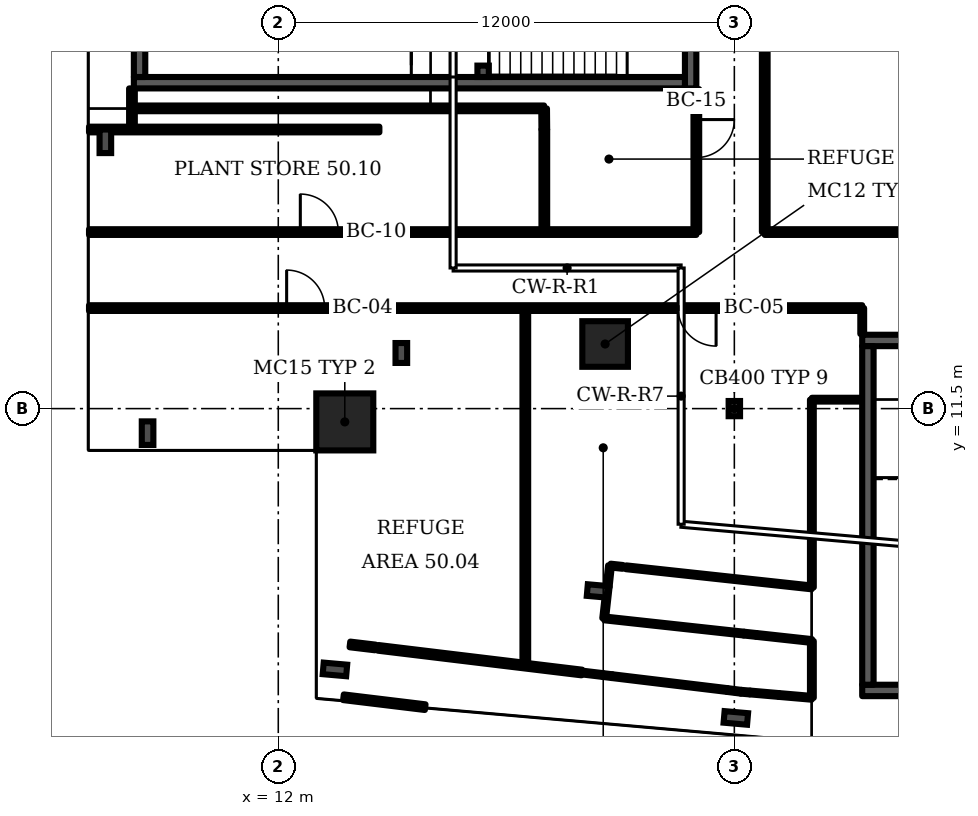
"""IFC4 building model, lengths in metres.
Left out: names, types, materials, properties, quantities, classifications, styles, units other than length and angle.
Written with IfcOpenShell. Run it as: python <this file> out.ifc"""

import sys

from ifc_helpers import new_model, si_unit, direction, frame, frame_2d, origin, origin_2d, place, context, subcontext, project, spatial, rectangle, i_section, extrude, element, fill, save


model = new_model("IFC4")
c1 = context("Model", 3, precision=1e-05, world=origin(), true_north=direction((0.0, 1.0)))
c2 = subcontext(c1, "Body", "Model", "MODEL_VIEW")
j1 = project(units=[si_unit("LENGTHUNIT", "METRE"), si_unit("PLANEANGLEUNIT", "RADIAN")], contexts=[c1])
p1 = place(None, origin())
s1 = spatial("IfcSite", under=j1, at=p1, CompositionType="ELEMENT")
p2 = place(p1, origin())
s2 = spatial("IfcBuilding", under=s1, at=p2, CompositionType="ELEMENT")
p3 = place(p2, frame((0.0, 0.0, 202.3)))
s3 = spatial("IfcBuildingStorey", under=s2, at=p3, CompositionType="ELEMENT", Elevation=202.3)
p4 = place(p3, frame((20.6, 13.2, 0.0), z_axis=(0.0, 0.0, 1.0), x_axis=(1.0, 0.0, 0.0)))
e1 = element("IfcColumn", 1, at=p4, inside=s3, PredefinedType="COLUMN", context=c2, shape_type="SweptSolid", body=[
    extrude(rectangle(XDim=1.2, YDim=1.2, at=origin_2d()), origin(), (0.0, 0.0, 1.0), 4.8),
])
for number, where, z_axis, x_axis in (
    (2, (20.392, 6.703, 0.0), (0.0, 0.0, 1.0), (-0.087, -0.996, 0.0)),
    (3, (15.238, 12.963, 0.0), (0.0, 0.0, 1.0), (-1.0, 0.0, 0.0)),
):
    element("IfcColumn", number, at=place(p3, frame(where, z_axis=z_axis, x_axis=x_axis)), inside=s3, PredefinedType="COLUMN", context=c2, shape_type="SweptSolid", body=[
        extrude(i_section(OverallWidth=0.306, OverallDepth=0.524, WebThickness=0.021, FlangeThickness=0.04, FilletRadius=0.027, at=origin_2d()), origin(), (0.0, 0.0, 1.0), 4.8),
    ])
p5 = place(p3, frame((24.0, 11.5, 0.0), z_axis=(0.0, 0.0, 1.0), x_axis=(1.0, 0.0, 0.0)))
e4 = element("IfcColumn", 4, at=p5, inside=s3, PredefinedType="COLUMN", context=c2, shape_type="SweptSolid", body=[
    extrude(i_section(OverallWidth=0.3, OverallDepth=0.4, WebThickness=0.013, FlangeThickness=0.024, FilletRadius=0.027, at=origin_2d()), origin(), (0.0, 0.0, 1.0), 4.8),
])
p6 = place(p3, frame((13.75, 11.15, 0.0), z_axis=(0.0, 0.0, 1.0), x_axis=(1.0, 0.0, 0.0)))
e5 = element("IfcColumn", 5, at=p6, inside=s3, PredefinedType="COLUMN", context=c2, shape_type="SweptSolid", body=[
    extrude(rectangle(XDim=1.5, YDim=1.5, at=origin_2d()), origin(), (0.0, 0.0, 1.0), 4.8),
])
for number, where, z_axis, x_axis in (
    (6, (13.491, 4.637, 0.0), (0.0, 0.0, 1.0), (-0.087, -0.996, 0.0)),
    (7, (24.039, 3.361, 0.0), (0.0, 0.0, 1.0), (-0.087, -0.996, 0.0)),
    (8, (7.45, 18.533, 0.0), (0.0, 0.0, 1.0), (-1.0, 0.0, 0.0)),
    (9, (8.561, 10.854, 0.0), (0.0, 0.0, 1.0), (-1.0, 0.0, 0.0)),
):
    element("IfcColumn", number, at=place(p3, frame(where, z_axis=z_axis, x_axis=x_axis)), inside=s3, PredefinedType="COLUMN", context=c2, shape_type="SweptSolid", body=[
        extrude(i_section(OverallWidth=0.305, OverallDepth=0.62, WebThickness=0.021, FlangeThickness=0.04, FilletRadius=0.027, at=origin_2d()), origin(), (0.0, 0.0, 1.0), 4.8),
    ])
p7 = place(p3, frame((22.85, 19.925, 0.0), z_axis=(0.0, 0.0, 1.0), x_axis=(0.0, 1.0, 0.0)))
e10 = element("IfcWall", 10, at=p7, inside=s3, PredefinedType="SHEAR", context=c2, shape_type="SweptSolid", body=[
    extrude(rectangle(XDim=5.15, YDim=0.3, at=frame_2d((2.575, 0.0))), origin(), (0.0, 0.0, 1.0), 4.4),
])
p8 = place(p7, frame((1.575, 0.0, 0.0)))
e11 = element("IfcOpeningElement", 11, at=p8, cuts=e10, PredefinedType="OPENING", context=c2, shape_type="SweptSolid", body=[
    extrude(rectangle(XDim=1.2, YDim=2.1, at=frame_2d((0.6, 1.05))), frame((0.0, 0.16, 0.0), z_axis=(0.0, -1.0, 0.0), x_axis=(1.0, 0.0, 0.0)), (0.0, 0.0, 1.0), 0.32),
])
p9 = place(p3, frame((27.364, 13.293, 0.0), z_axis=(0.0, 0.0, 1.0), x_axis=(1.0, 0.0, 0.0)))
e12 = element("IfcWall", 12, at=p9, inside=s3, PredefinedType="SHEAR", context=c2, shape_type="SweptSolid", body=[
    extrude(rectangle(XDim=16.963, YDim=0.3, at=frame_2d((8.481, 0.0))), origin(), (0.0, 0.0, 1.0), 4.4),
])
p10 = place(p9, frame((14.188, 0.0, 0.0)))
e13 = element("IfcOpeningElement", 13, at=p10, cuts=e12, PredefinedType="OPENING", context=c2, shape_type="SweptSolid", body=[
    extrude(rectangle(XDim=1.2, YDim=2.1, at=frame_2d((0.6, 1.05))), frame((0.0, 0.16, 0.0), z_axis=(0.0, -1.0, 0.0), x_axis=(1.0, 0.0, 0.0)), (0.0, 0.0, 1.0), 0.32),
])
p11 = place(p3, frame((7.02, 14.145, 0.0), z_axis=(0.0, 0.0, 1.0), x_axis=(1.0, 0.0, 0.0)))
e14 = element("IfcWall", 14, at=p11, inside=s3, PredefinedType="PARTITIONING", context=c2, shape_type="SweptSolid", body=[
    extrude(rectangle(XDim=20.345, YDim=0.15, at=frame_2d((10.172, 0.0))), origin(), (0.0, 0.0, 1.0), 4.4),
])
p12 = place(p11, frame((5.2, 0.0, 0.0)))
e15 = element("IfcOpeningElement", 15, at=p12, cuts=e14, PredefinedType="OPENING", context=c2, shape_type="SweptSolid", body=[
    extrude(rectangle(XDim=1.0, YDim=2.1, at=frame_2d((0.5, 1.05))), frame((0.0, 0.085, 0.0), z_axis=(0.0, -1.0, 0.0), x_axis=(1.0, 0.0, 0.0)), (0.0, 0.0, 1.0), 0.17),
])
p13 = place(p11, frame((15.5, 0.0, 0.0)))
e16 = element("IfcOpeningElement", 16, at=p13, cuts=e14, PredefinedType="OPENING", context=c2, shape_type="SweptSolid", body=[
    extrude(rectangle(XDim=1.0, YDim=2.1, at=frame_2d((0.5, 1.05))), frame((0.0, 0.085, 0.0), z_axis=(0.0, -1.0, 0.0), x_axis=(1.0, 0.0, 0.0)), (0.0, 0.0, 1.0), 0.17),
])
p14 = place(p3, frame((7.02, 16.145, 0.0), z_axis=(0.0, 0.0, 1.0), x_axis=(1.0, 0.0, 0.0)))
e17 = element("IfcWall", 17, at=p14, inside=s3, PredefinedType="PARTITIONING", context=c2, shape_type="SweptSolid", body=[
    extrude(rectangle(XDim=15.98, YDim=0.15, at=frame_2d((7.99, 0.0))), origin(), (0.0, 0.0, 1.0), 4.4),
])
p15 = place(p14, frame((5.56, 0.0, 0.0)))
e18 = element("IfcOpeningElement", 18, at=p15, cuts=e17, PredefinedType="OPENING", context=c2, shape_type="SweptSolid", body=[
    extrude(rectangle(XDim=1.0, YDim=2.1, at=frame_2d((0.5, 1.05))), frame((0.0, 0.085, 0.0), z_axis=(0.0, -1.0, 0.0), x_axis=(1.0, 0.0, 0.0)), (0.0, 0.0, 1.0), 0.17),
])
p16 = place(p3, frame((7.02, 18.843, 0.0), z_axis=(0.0, 0.0, 1.0), x_axis=(1.0, 0.0, 0.0)))
e19 = element("IfcWall", 19, at=p16, inside=s3, PredefinedType="PARTITIONING", context=c2, shape_type="SweptSolid", body=[
    extrude(rectangle(XDim=7.64, YDim=0.15, at=frame_2d((3.82, 0.0))), origin(), (0.0, 0.0, 1.0), 4.4),
])
p17 = place(p3, frame((8.15, 18.85, 0.0), z_axis=(0.0, 0.0, 1.0), x_axis=(0.0, 1.0, 0.0)))
e20 = element("IfcWall", 20, at=p17, inside=s3, PredefinedType="PARTITIONING", context=c2, shape_type="SweptSolid", body=[
    extrude(rectangle(XDim=1.075, YDim=0.15, at=frame_2d((0.538, 0.0))), origin(), (0.0, 0.0, 1.0), 4.4),
])
p18 = place(p3, frame((8.15, 19.4, 0.0), z_axis=(0.0, 0.0, 1.0), x_axis=(1.0, 0.0, 0.0)))
e21 = element("IfcWall", 21, at=p18, inside=s3, PredefinedType="PARTITIONING", context=c2, shape_type="SweptSolid", body=[
    extrude(rectangle(XDim=10.845, YDim=0.15, at=frame_2d((5.423, 0.0))), origin(), (0.0, 0.0, 1.0), 4.4),
])
p19 = place(p3, frame((14.555, 5.215, 0.0), z_axis=(0.0, 0.0, 1.0), x_axis=(-0.992976, 0.118332, 0.0)))
e22 = element("IfcWall", 22, at=p19, inside=s3, PredefinedType="PARTITIONING", context=c2, shape_type="SweptSolid", body=[
    extrude(rectangle(XDim=0.675, YDim=0.15, at=frame_2d((0.337, 0.0))), origin(), (0.0, 0.0, 1.0), 4.4),
])
p20 = place(p3, frame((15.866, 3.644, 0.0), z_axis=(0.0, 0.0, 1.0), x_axis=(-0.992728, 0.120358, 0.0)))
e23 = element("IfcWall", 23, at=p20, inside=s3, PredefinedType="PARTITIONING", context=c2, shape_type="SweptSolid", body=[
    extrude(rectangle(XDim=2.167, YDim=0.15, at=frame_2d((1.083, 0.0))), origin(), (0.0, 0.0, 1.0), 4.4),
])
p21 = place(p3, frame((18.5, 4.736, 0.0), z_axis=(0.0, 0.0, 1.0), x_axis=(0.0, 1.0, 0.0)))
e24 = element("IfcWall", 24, at=p21, inside=s3, PredefinedType="PARTITIONING", context=c2, shape_type="SweptSolid", body=[
    extrude(rectangle(XDim=9.409, YDim=0.15, at=frame_2d((4.704, 0.0))), origin(), (0.0, 0.0, 1.0), 4.4),
])
p22 = place(p3, frame((19.0, 16.145, 0.0), z_axis=(0.0, 0.0, 1.0), x_axis=(0.0, 1.0, 0.0)))
e25 = element("IfcWall", 25, at=p22, inside=s3, PredefinedType="PARTITIONING", context=c2, shape_type="SweptSolid", body=[
    extrude(rectangle(XDim=2.7, YDim=0.15, at=frame_2d((1.35, 0.0))), origin(), (0.0, 0.0, 1.0), 4.4),
])
p23 = place(p3, frame((19.0, 18.845, 0.0), z_axis=(0.0, 0.0, 1.0), x_axis=(-0.008877, 0.999965, 0.0)))
e26 = element("IfcWall", 26, at=p23, inside=s3, PredefinedType="PARTITIONING", context=c2, shape_type="SweptSolid", body=[
    extrude(rectangle(XDim=0.55, YDim=0.15, at=frame_2d((0.275, 0.0))), origin(), (0.0, 0.0, 1.0), 4.4),
])
p24 = place(p3, frame((19.988, 4.556, 0.0), z_axis=(0.0, 0.0, 1.0), x_axis=(-0.992757, 0.120104, 0.0)))
e27 = element("IfcWall", 27, at=p24, inside=s3, PredefinedType="PARTITIONING", context=c2, shape_type="SweptSolid", body=[
    extrude(rectangle(XDim=5.399, YDim=0.15, at=frame_2d((2.699, 0.0))), origin(), (0.0, 0.0, 1.0), 4.4),
])
p25 = place(p3, frame((20.54, 4.49, 0.0), z_axis=(0.0, 0.0, 1.0), x_axis=(-0.992858, 0.119336, 0.0)))
e28 = element("IfcWall", 28, at=p25, inside=s3, PredefinedType="PARTITIONING", context=c2, shape_type="SweptSolid", body=[
    extrude(rectangle(XDim=0.556, YDim=0.1, at=frame_2d((0.278, 0.0))), origin(), (0.0, 0.0, 1.0), 4.4),
])
p26 = place(p3, frame((20.575, 5.98, 0.0), z_axis=(0.0, 0.0, 1.0), x_axis=(0.1104, 0.993888, 0.0)))
e29 = element("IfcWall", 29, at=p26, inside=s3, PredefinedType="PARTITIONING", context=c2, shape_type="SweptSolid", body=[
    extrude(rectangle(XDim=0.847, YDim=0.1, at=frame_2d((0.423, 0.0))), origin(), (0.0, 0.0, 1.0), 4.4),
])
p27 = place(p3, frame((20.667, 6.811, 0.0), z_axis=(0.0, 0.0, 1.0), x_axis=(0.108143, 0.994134, 0.0)))
e30 = element("IfcWall", 30, at=p27, inside=s3, PredefinedType="PARTITIONING", context=c2, shape_type="SweptSolid", body=[
    extrude(rectangle(XDim=0.562, YDim=0.1, at=frame_2d((0.281, 0.0))), origin(), (0.0, 0.0, 1.0), 4.4),
])
p28 = place(p3, frame((20.785, 4.46, 0.0), z_axis=(0.0, 0.0, 1.0), x_axis=(-0.992562, 0.12172, 0.0)))
e31 = element("IfcWall", 31, at=p28, inside=s3, PredefinedType="PARTITIONING", context=c2, shape_type="SweptSolid", body=[
    extrude(rectangle(XDim=0.247, YDim=0.1, at=frame_2d((0.124, 0.0))), origin(), (0.0, 0.0, 1.0), 4.4),
])
p29 = place(p3, frame((21.065, 7.335, 0.0), z_axis=(0.0, 0.0, 1.0), x_axis=(-0.994202, 0.107562, 0.0)))
e32 = element("IfcWall", 32, at=p29, inside=s3, PredefinedType="PARTITIONING", context=c2, shape_type="SweptSolid", body=[
    extrude(rectangle(XDim=0.327, YDim=0.1, at=frame_2d((0.164, 0.0))), origin(), (0.0, 0.0, 1.0), 4.4),
])
p30 = place(p3, frame((23.0, 16.145, 0.0), z_axis=(0.0, 0.0, 1.0), x_axis=(0.0, 1.0, 0.0)))
e33 = element("IfcWall", 33, at=p30, inside=s3, PredefinedType="PARTITIONING", context=c2, shape_type="SweptSolid", body=[
    extrude(rectangle(XDim=3.76, YDim=0.15, at=frame_2d((1.88, 0.0))), origin(), (0.0, 0.0, 1.0), 4.4),
])
p31 = place(p30, frame((1.96, 0.0, 0.0)))
e34 = element("IfcOpeningElement", 34, at=p31, cuts=e33, PredefinedType="OPENING", context=c2, shape_type="SweptSolid", body=[
    extrude(rectangle(XDim=1.0, YDim=2.1, at=frame_2d((0.5, 1.05))), frame((0.0, 0.085, 0.0), z_axis=(0.0, -1.0, 0.0), x_axis=(1.0, 0.0, 0.0)), (0.0, 0.0, 1.0), 0.17),
])
p32 = place(p3, frame((23.815, 4.095, 0.0), z_axis=(0.0, 0.0, 1.0), x_axis=(-0.992822, 0.119593, 0.0)))
e35 = element("IfcWall", 35, at=p32, inside=s3, PredefinedType="PARTITIONING", context=c2, shape_type="SweptSolid", body=[
    extrude(rectangle(XDim=3.052, YDim=0.1, at=frame_2d((1.526, 0.0))), origin(), (0.0, 0.0, 1.0), 4.4),
])
p33 = place(p3, frame((24.175, 4.05, 0.0), z_axis=(0.0, 0.0, 1.0), x_axis=(-0.992306, 0.123786, 0.0)))
e36 = element("IfcWall", 36, at=p33, inside=s3, PredefinedType="PARTITIONING", context=c2, shape_type="SweptSolid", body=[
    extrude(rectangle(XDim=0.363, YDim=0.1, at=frame_2d((0.181, 0.0))), origin(), (0.0, 0.0, 1.0), 4.4),
])
p34 = place(p3, frame((24.25, 5.58, 0.0), z_axis=(0.0, 0.0, 1.0), x_axis=(-0.994113, 0.108332, 0.0)))
e37 = element("IfcWall", 37, at=p34, inside=s3, PredefinedType="PARTITIONING", context=c2, shape_type="SweptSolid", body=[
    extrude(rectangle(XDim=3.689, YDim=0.1, at=frame_2d((1.845, 0.0))), origin(), (0.0, 0.0, 1.0), 4.4),
])
p35 = place(p3, frame((24.409, 4.03, 0.0), z_axis=(0.0, 0.0, 1.0), x_axis=(-0.996355, 0.085283, 0.0)))
e38 = element("IfcWall", 38, at=p35, inside=s3, PredefinedType="PARTITIONING", context=c2, shape_type="SweptSolid", body=[
    extrude(rectangle(XDim=0.235, YDim=0.1, at=frame_2d((0.117, 0.0))), origin(), (0.0, 0.0, 1.0), 4.4),
])
p36 = place(p3, frame((24.575, 5.545, 0.0), z_axis=(0.0, 0.0, 1.0), x_axis=(-0.994202, 0.107562, 0.0)))
e39 = element("IfcWall", 39, at=p36, inside=s3, PredefinedType="PARTITIONING", context=c2, shape_type="SweptSolid", body=[
    extrude(rectangle(XDim=0.327, YDim=0.1, at=frame_2d((0.164, 0.0))), origin(), (0.0, 0.0, 1.0), 4.4),
])
p37 = place(p3, frame((24.8, 16.145, 0.0), z_axis=(0.0, 0.0, 1.0), x_axis=(0.0, 1.0, 0.0)))
e40 = element("IfcWall", 40, at=p37, inside=s3, PredefinedType="PARTITIONING", context=c2, shape_type="SweptSolid", body=[
    extrude(rectangle(XDim=7.105, YDim=0.15, at=frame_2d((3.552, 0.0))), origin(), (0.0, 0.0, 1.0), 4.4),
])
p38 = place(p3, frame((24.8, 16.145, 0.0), z_axis=(0.0, 0.0, 1.0), x_axis=(1.0, 0.0, 0.0)))
e41 = element("IfcWall", 41, at=p38, inside=s3, PredefinedType="PARTITIONING", context=c2, shape_type="SweptSolid", body=[
    extrude(rectangle(XDim=37.305, YDim=0.15, at=frame_2d((18.652, 0.0))), origin(), (0.0, 0.0, 1.0), 4.4),
])
p39 = place(p38, frame((23.78, 0.0, 0.0)))
e42 = element("IfcOpeningElement", 42, at=p39, cuts=e41, PredefinedType="OPENING", context=c2, shape_type="SweptSolid", body=[
    extrude(rectangle(XDim=1.0, YDim=2.1, at=frame_2d((0.5, 1.05))), frame((0.0, 0.085, 0.0), z_axis=(0.0, -1.0, 0.0), x_axis=(1.0, 0.0, 0.0)), (0.0, 0.0, 1.0), 0.17),
])
p40 = place(p38, frame((33.705, 0.0, 0.0)))
e43 = element("IfcOpeningElement", 43, at=p40, cuts=e41, PredefinedType="OPENING", context=c2, shape_type="SweptSolid", body=[
    extrude(rectangle(XDim=1.0, YDim=2.1, at=frame_2d((0.5, 1.05))), frame((0.0, 0.085, 0.0), z_axis=(0.0, -1.0, 0.0), x_axis=(1.0, 0.0, 0.0)), (0.0, 0.0, 1.0), 0.17),
])
p41 = place(p3, frame((25.167, 3.965, 0.0), z_axis=(0.0, 0.0, 1.0), x_axis=(-0.996212, 0.086976, 0.0)))
e44 = element("IfcWall", 44, at=p41, inside=s3, PredefinedType="PARTITIONING", context=c2, shape_type="SweptSolid", body=[
    extrude(rectangle(XDim=0.761, YDim=0.1, at=frame_2d((0.38, 0.0))), origin(), (0.0, 0.0, 1.0), 4.4),
])
p42 = place(p3, frame((26.04, 3.89, 0.0), z_axis=(0.0, 0.0, 1.0), x_axis=(-0.996288, 0.086099, 0.0)))
e45 = element("IfcWall", 45, at=p42, inside=s3, PredefinedType="PARTITIONING", context=c2, shape_type="SweptSolid", body=[
    extrude(rectangle(XDim=0.873, YDim=0.1, at=frame_2d((0.437, 0.0))), origin(), (0.0, 0.0, 1.0), 4.4),
])
p43 = place(p3, frame((26.04, 3.89, 0.0), z_axis=(0.0, 0.0, 1.0), x_axis=(0.0, 1.0, 0.0)))
e46 = element("IfcWall", 46, at=p43, inside=s3, PredefinedType="PARTITIONING", context=c2, shape_type="SweptSolid", body=[
    extrude(rectangle(XDim=1.495, YDim=0.1, at=frame_2d((0.748, 0.0))), origin(), (0.0, 0.0, 1.0), 4.4),
])
p44 = place(p3, frame((26.04, 5.385, 0.0), z_axis=(0.0, 0.0, 1.0), x_axis=(-0.994063, 0.108822, 0.0)))
e47 = element("IfcWall", 47, at=p44, inside=s3, PredefinedType="PARTITIONING", context=c2, shape_type="SweptSolid", body=[
    extrude(rectangle(XDim=1.465, YDim=0.1, at=frame_2d((0.732, 0.0))), origin(), (0.0, 0.0, 1.0), 4.4),
])
p45 = place(p3, frame((26.04, 6.795, 0.0), z_axis=(0.0, 0.0, 1.0), x_axis=(0.0, 1.0, 0.0)))
e48 = element("IfcWall", 48, at=p45, inside=s3, PredefinedType="PARTITIONING", context=c2, shape_type="SweptSolid", body=[
    extrude(rectangle(XDim=4.94, YDim=0.1, at=frame_2d((2.47, 0.0))), origin(), (0.0, 0.0, 1.0), 4.4),
])
p46 = place(p3, frame((26.04, 11.735, 0.0), z_axis=(0.0, 0.0, 1.0), x_axis=(1.0, 0.0, 0.0)))
e49 = element("IfcWall", 49, at=p46, inside=s3, PredefinedType="PARTITIONING", context=c2, shape_type="SweptSolid", body=[
    extrude(rectangle(XDim=1.304, YDim=0.1, at=frame_2d((0.652, 0.0))), origin(), (0.0, 0.0, 1.0), 4.4),
])
p47 = place(p3, frame((26.04, 6.795, 0.0), z_axis=(0.0, 0.0, 1.0), x_axis=(-0.994174, 0.107756, 0.0)))
e50 = element("IfcWall", 50, at=p47, inside=s3, PredefinedType="PARTITIONING", context=c2, shape_type="SweptSolid", body=[
    extrude(rectangle(XDim=4.919, YDim=0.1, at=frame_2d((2.459, 0.0))), origin(), (0.0, 0.0, 1.0), 4.4),
])
p48 = place(p3, frame((27.365, 13.463, 0.0), z_axis=(0.0, 0.0, 1.0), x_axis=(0.0, 1.0, 0.0)))
e51 = element("IfcWall", 51, at=p48, inside=s3, PredefinedType="PARTITIONING", context=c2, shape_type="SweptSolid", body=[
    extrude(rectangle(XDim=0.682, YDim=0.1, at=frame_2d((0.341, 0.0))), origin(), (0.0, 0.0, 1.0), 4.4),
])
p49 = place(p3, frame((8.2, 20.075, 0.0), z_axis=(0.0, 0.0, 1.0), x_axis=(1.0, 0.0, 0.0)))
e52 = element("IfcWall", 52, at=p49, inside=s3, PredefinedType="SHEAR", context=c2, shape_type="SweptSolid", body=[
    extrude(rectangle(XDim=14.5, YDim=0.3, at=frame_2d((7.25, 0.0))), origin(), (0.0, 0.0, 1.0), 4.4),
])
p50 = place(p3, frame((8.35, 20.225, 0.0), z_axis=(0.0, 0.0, 1.0), x_axis=(0.0, 1.0, 0.0)))
e53 = element("IfcWall", 53, at=p50, inside=s3, PredefinedType="SHEAR", context=c2, shape_type="SweptSolid", body=[
    extrude(rectangle(XDim=4.55, YDim=0.3, at=frame_2d((2.275, 0.0))), origin(), (0.0, 0.0, 1.0), 4.4),
])
p51 = place(p3, frame((27.364, 4.084, 0.0), z_axis=(0.0, 0.0, 1.0), x_axis=(1.0, 0.0, 0.0)))
e54 = element("IfcWall", 54, at=p51, inside=s3, PredefinedType="SHEAR", context=c2, shape_type="SweptSolid", body=[
    extrude(rectangle(XDim=16.963, YDim=0.3, at=frame_2d((8.481, 0.0))), origin(), (0.0, 0.0, 1.0), 4.4),
])
p52 = place(p3, frame((27.514, 4.234, 0.0), z_axis=(0.0, 0.0, 1.0), x_axis=(0.0, 1.0, 0.0)))
e55 = element("IfcWall", 55, at=p52, inside=s3, PredefinedType="SHEAR", context=c2, shape_type="SweptSolid", body=[
    extrude(rectangle(XDim=8.909, YDim=0.3, at=frame_2d((4.455, 0.0))), origin(), (0.0, 0.0, 1.0), 4.4),
])
p53 = place(p3, frame((17.39, 20.375, 0.0), z_axis=(0.0, 0.0, 1.0), x_axis=(1.0, 0.0, 0.0)))
e56 = element("IfcColumn", 56, at=p53, inside=s3, PredefinedType="COLUMN", context=c2, shape_type="SweptSolid", body=[
    extrude(rectangle(XDim=0.3, YDim=0.3, at=origin_2d()), origin(), (0.0, 0.0, 1.0), 2.2),
])
p54 = place(p12, origin())
e57 = element("IfcDoor", 57, at=p54, inside=s3, OperationType="SINGLE_SWING_LEFT", PredefinedType="DOOR", context=c2, shape_type="SweptSolid", body=[
    extrude(rectangle(XDim=1.0, YDim=2.1, at=frame_2d((0.5, 1.05))), frame((0.0, 0.025, 0.0), z_axis=(0.0, -1.0, 0.0), x_axis=(1.0, 0.0, 0.0)), (0.0, 0.0, 1.0), 0.05),
])
fill(e15, e57)
p55 = place(p13, origin())
e58 = element("IfcDoor", 58, at=p55, inside=s3, OperationType="SINGLE_SWING_RIGHT", PredefinedType="DOOR", context=c2, shape_type="SweptSolid", body=[
    extrude(rectangle(XDim=1.0, YDim=2.1, at=frame_2d((0.5, 1.05))), frame((0.0, 0.025, 0.0), z_axis=(0.0, -1.0, 0.0), x_axis=(1.0, 0.0, 0.0)), (0.0, 0.0, 1.0), 0.05),
])
fill(e16, e58)
p56 = place(p15, origin())
e59 = element("IfcDoor", 59, at=p56, inside=s3, OperationType="SINGLE_SWING_LEFT", PredefinedType="DOOR", context=c2, shape_type="SweptSolid", body=[
    extrude(rectangle(XDim=1.0, YDim=2.1, at=frame_2d((0.5, 1.05))), frame((0.0, 0.025, 0.0), z_axis=(0.0, -1.0, 0.0), x_axis=(1.0, 0.0, 0.0)), (0.0, 0.0, 1.0), 0.05),
])
fill(e18, e59)
p57 = place(p31, origin())
e60 = element("IfcDoor", 60, at=p57, inside=s3, OperationType="SINGLE_SWING_RIGHT", PredefinedType="DOOR", context=c2, shape_type="SweptSolid", body=[
    extrude(rectangle(XDim=1.0, YDim=2.1, at=frame_2d((0.5, 1.05))), frame((0.0, 0.025, 0.0), z_axis=(0.0, -1.0, 0.0), x_axis=(1.0, 0.0, 0.0)), (0.0, 0.0, 1.0), 0.05),
])
fill(e34, e60)
save(model, sys.argv[1])
